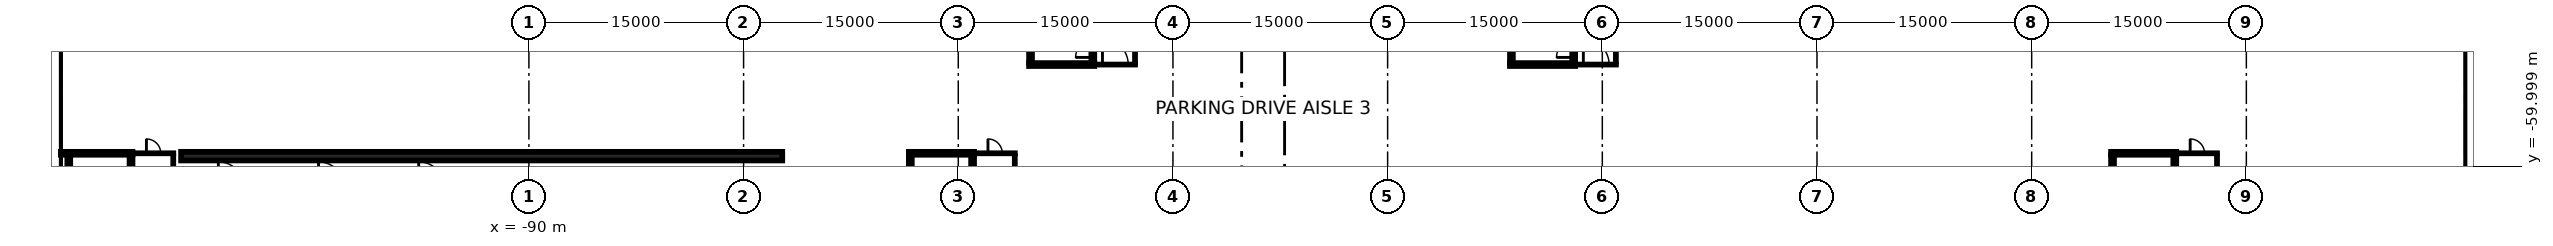
"""IFC4 building model, lengths in metres.
Left out: names, types, materials, properties, quantities, classifications, styles, units other than length and angle.
Written with IfcOpenShell. Run it as: python <this file> out.ifc"""

import sys

from ifc_helpers import new_model, si_unit, direction, frame, frame_2d, origin, place, context, subcontext, project, spatial, rectangle, extrude, element, fill, save


model = new_model("IFC4")
c1 = context("Model", 3, precision=1e-05, world=origin(), true_north=direction((0.0, 1.0)))
c2 = subcontext(c1, "Body", "Model", "MODEL_VIEW")
j1 = project(units=[si_unit("LENGTHUNIT", "METRE"), si_unit("PLANEANGLEUNIT", "RADIAN")], contexts=[c1])
p1 = place(None, origin())
s1 = spatial("IfcSite", under=j1, at=p1, CompositionType="ELEMENT")
p2 = place(p1, origin())
s2 = spatial("IfcBuilding", under=s1, at=p2, CompositionType="ELEMENT")
p3 = place(p2, frame((0.0, 0.0, -12.0)))
s3 = spatial("IfcBuildingStorey", under=s2, at=p3, CompositionType="ELEMENT", Elevation=-12.0)
for number, where, z_axis, x_axis in (
    (1, (-123.15, -80.0, 0.0), (0.0, 0.0, 1.0), (0.0, 1.0, 0.0)),
    (2, (45.75, -80.0, 0.0), (0.0, 0.0, 1.0), (0.0, 1.0, 0.0)),
):
    element("IfcWall", number, at=place(p3, frame(where, z_axis=z_axis, x_axis=x_axis)), inside=s3, PredefinedType="USERDEFINED", context=c2, shape_type="SweptSolid", body=[
        extrude(rectangle(XDim=160.0, YDim=0.9, at=frame_2d((80.0, 0.0))), origin(), (0.0, 0.0, 1.0), 11.55),
    ])
p4 = place(p2, frame((0.0, 0.0, -7.2)))
s4 = spatial("IfcBuildingStorey", under=s2, at=p4, CompositionType="ELEMENT", Elevation=-7.2)
p5 = place(p4, frame((-58.9, -59.1, 0.0), z_axis=(0.0, 0.0, 1.0), x_axis=(1.0, 0.0, 0.0)))
e3 = element("IfcWall", 3, at=p5, inside=s4, PredefinedType="PARTITIONING", context=c2, shape_type="SweptSolid", body=[
    extrude(rectangle(XDim=2.95, YDim=0.2, at=frame_2d((1.475, 0.0))), origin(), (0.0, 0.0, 1.0), 3.2),
])
p6 = place(p5, frame((0.975, 0.0, 0.0)))
e4 = element("IfcOpeningElement", 4, at=p6, cuts=e3, PredefinedType="OPENING", context=c2, shape_type="SweptSolid", body=[
    extrude(rectangle(XDim=1.0, YDim=2.1, at=frame_2d((0.5, 1.05))), frame((0.0, 0.11, 0.0), z_axis=(0.0, -1.0, 0.0), x_axis=(1.0, 0.0, 0.0)), (0.0, 0.0, 1.0), 0.22),
])
p7 = place(p4, frame((-56.05, -64.8, 0.0), z_axis=(0.0, 0.0, 1.0), x_axis=(0.0, 1.0, 0.0)))
e5 = element("IfcWall", 5, at=p7, inside=s4, PredefinedType="PARTITIONING", context=c2, shape_type="SweptSolid", body=[
    extrude(rectangle(XDim=5.6, YDim=0.2, at=frame_2d((2.8, 0.0))), origin(), (0.0, 0.0, 1.0), 3.2),
])
p8 = place(p4, frame((-50.5, -52.9, 0.0), z_axis=(0.0, 0.0, 1.0), x_axis=(1.0, 0.0, 0.0)))
e6 = element("IfcWall", 6, at=p8, inside=s4, PredefinedType="PARTITIONING", context=c2, shape_type="SweptSolid", body=[
    extrude(rectangle(XDim=2.95, YDim=0.2, at=frame_2d((1.475, 0.0))), origin(), (0.0, 0.0, 1.0), 3.2),
])
p9 = place(p8, frame((0.575, 0.0, 0.0)))
e7 = element("IfcOpeningElement", 7, at=p9, cuts=e6, PredefinedType="OPENING", context=c2, shape_type="SweptSolid", body=[
    extrude(rectangle(XDim=1.8, YDim=2.1, at=frame_2d((0.9, 1.05))), frame((0.0, 0.11, 0.0), z_axis=(0.0, -1.0, 0.0), x_axis=(1.0, 0.0, 0.0)), (0.0, 0.0, 1.0), 0.22),
])
p10 = place(p4, frame((-47.65, -52.8, 0.0), z_axis=(0.0, 0.0, 1.0), x_axis=(0.0, 1.0, 0.0)))
e8 = element("IfcWall", 8, at=p10, inside=s4, PredefinedType="PARTITIONING", context=c2, shape_type="SweptSolid", body=[
    extrude(rectangle(XDim=3.6, YDim=0.2, at=frame_2d((1.8, 0.0))), origin(), (0.0, 0.0, 1.0), 3.2),
])
p11 = place(p4, frame((-16.9, -52.9, 0.0), z_axis=(0.0, 0.0, 1.0), x_axis=(1.0, 0.0, 0.0)))
e9 = element("IfcWall", 9, at=p11, inside=s4, PredefinedType="PARTITIONING", context=c2, shape_type="SweptSolid", body=[
    extrude(rectangle(XDim=2.95, YDim=0.2, at=frame_2d((1.475, 0.0))), origin(), (0.0, 0.0, 1.0), 3.2),
])
p12 = place(p11, frame((0.575, 0.0, 0.0)))
e10 = element("IfcOpeningElement", 10, at=p12, cuts=e9, PredefinedType="OPENING", context=c2, shape_type="SweptSolid", body=[
    extrude(rectangle(XDim=1.8, YDim=2.1, at=frame_2d((0.9, 1.05))), frame((0.0, 0.11, 0.0), z_axis=(0.0, -1.0, 0.0), x_axis=(1.0, 0.0, 0.0)), (0.0, 0.0, 1.0), 0.22),
])
p13 = place(p4, frame((-14.05, -52.8, 0.0), z_axis=(0.0, 0.0, 1.0), x_axis=(0.0, 1.0, 0.0)))
e11 = element("IfcWall", 11, at=p13, inside=s4, PredefinedType="PARTITIONING", context=c2, shape_type="SweptSolid", body=[
    extrude(rectangle(XDim=3.6, YDim=0.2, at=frame_2d((1.8, 0.0))), origin(), (0.0, 0.0, 1.0), 3.2),
])
p14 = place(p4, frame((25.1, -59.1, 0.0), z_axis=(0.0, 0.0, 1.0), x_axis=(1.0, 0.0, 0.0)))
e12 = element("IfcWall", 12, at=p14, inside=s4, PredefinedType="PARTITIONING", context=c2, shape_type="SweptSolid", body=[
    extrude(rectangle(XDim=2.95, YDim=0.2, at=frame_2d((1.475, 0.0))), origin(), (0.0, 0.0, 1.0), 3.2),
])
p15 = place(p14, frame((0.975, 0.0, 0.0)))
e13 = element("IfcOpeningElement", 13, at=p15, cuts=e12, PredefinedType="OPENING", context=c2, shape_type="SweptSolid", body=[
    extrude(rectangle(XDim=1.0, YDim=2.1, at=frame_2d((0.5, 1.05))), frame((0.0, 0.11, 0.0), z_axis=(0.0, -1.0, 0.0), x_axis=(1.0, 0.0, 0.0)), (0.0, 0.0, 1.0), 0.22),
])
p16 = place(p4, frame((27.95, -64.8, 0.0), z_axis=(0.0, 0.0, 1.0), x_axis=(0.0, 1.0, 0.0)))
e14 = element("IfcWall", 14, at=p16, inside=s4, PredefinedType="PARTITIONING", context=c2, shape_type="SweptSolid", body=[
    extrude(rectangle(XDim=5.6, YDim=0.2, at=frame_2d((2.8, 0.0))), origin(), (0.0, 0.0, 1.0), 3.2),
])
p17 = place(p4, frame((-117.7, -59.1, 0.0), z_axis=(0.0, 0.0, 1.0), x_axis=(1.0, 0.0, 0.0)))
e15 = element("IfcWall", 15, at=p17, inside=s4, PredefinedType="PARTITIONING", context=c2, shape_type="SweptSolid", body=[
    extrude(rectangle(XDim=2.95, YDim=0.2, at=frame_2d((1.475, 0.0))), origin(), (0.0, 0.0, 1.0), 3.2),
])
p18 = place(p17, frame((0.975, 0.0, 0.0)))
e16 = element("IfcOpeningElement", 16, at=p18, cuts=e15, PredefinedType="OPENING", context=c2, shape_type="SweptSolid", body=[
    extrude(rectangle(XDim=1.0, YDim=2.1, at=frame_2d((0.5, 1.05))), frame((0.0, 0.11, 0.0), z_axis=(0.0, -1.0, 0.0), x_axis=(1.0, 0.0, 0.0)), (0.0, 0.0, 1.0), 0.22),
])
p19 = place(p4, frame((-114.85, -64.8, 0.0), z_axis=(0.0, 0.0, 1.0), x_axis=(0.0, 1.0, 0.0)))
e17 = element("IfcWall", 17, at=p19, inside=s4, PredefinedType="PARTITIONING", context=c2, shape_type="SweptSolid", body=[
    extrude(rectangle(XDim=5.6, YDim=0.2, at=frame_2d((2.8, 0.0))), origin(), (0.0, 0.0, 1.0), 3.2),
])
p20 = place(p4, frame((-63.35, -68.8, 0.0), z_axis=(0.0, 0.0, 1.0), x_axis=(0.0, 1.0, 0.0)))
e18 = element("IfcWall", 18, at=p20, inside=s4, PredefinedType="SOLIDWALL", context=c2, shape_type="SweptSolid", body=[
    extrude(rectangle(XDim=9.6, YDim=0.2, at=frame_2d((4.8, 0.0))), origin(), (0.0, 0.0, 1.0), 3.2),
])
p21 = place(p4, frame((-59.0, -68.8, 0.0), z_axis=(0.0, 0.0, 1.0), x_axis=(0.0, 1.0, 0.0)))
e19 = element("IfcWall", 19, at=p21, inside=s4, PredefinedType="SOLIDWALL", context=c2, shape_type="SweptSolid", body=[
    extrude(rectangle(XDim=9.6, YDim=0.2, at=frame_2d((4.8, 0.0))), origin(), (0.0, 0.0, 1.0), 3.2),
])
p22 = place(p21, frame((0.4, 0.0, 0.0)))
e20 = element("IfcOpeningElement", 20, at=p22, cuts=e19, PredefinedType="OPENING", context=c2, shape_type="SweptSolid", body=[
    extrude(rectangle(XDim=1.2, YDim=2.1, at=frame_2d((0.6, 1.05))), frame((0.0, 0.11, 0.0), z_axis=(0.0, -1.0, 0.0), x_axis=(1.0, 0.0, 0.0)), (0.0, 0.0, 1.0), 0.22),
])
p23 = place(p4, frame((-63.45, -59.1, 0.0), z_axis=(0.0, 0.0, 1.0), x_axis=(1.0, 0.0, 0.0)))
e21 = element("IfcWall", 21, at=p23, inside=s4, PredefinedType="SOLIDWALL", context=c2, shape_type="SweptSolid", body=[
    extrude(rectangle(XDim=4.55, YDim=0.2, at=frame_2d((2.275, 0.0))), origin(), (0.0, 0.0, 1.0), 3.2),
])
p24 = place(p4, frame((-54.95, -52.8, 0.0), z_axis=(0.0, 0.0, 1.0), x_axis=(0.0, 1.0, 0.0)))
e22 = element("IfcWall", 22, at=p24, inside=s4, PredefinedType="SOLIDWALL", context=c2, shape_type="SweptSolid", body=[
    extrude(rectangle(XDim=9.6, YDim=0.2, at=frame_2d((4.8, 0.0))), origin(), (0.0, 0.0, 1.0), 3.2),
])
p25 = place(p4, frame((-50.6, -52.8, 0.0), z_axis=(0.0, 0.0, 1.0), x_axis=(0.0, 1.0, 0.0)))
e23 = element("IfcWall", 23, at=p25, inside=s4, PredefinedType="SOLIDWALL", context=c2, shape_type="SweptSolid", body=[
    extrude(rectangle(XDim=9.6, YDim=0.2, at=frame_2d((4.8, 0.0))), origin(), (0.0, 0.0, 1.0), 3.2),
])
p26 = place(p25, frame((0.4, 0.0, 0.0)))
e24 = element("IfcOpeningElement", 24, at=p26, cuts=e23, PredefinedType="OPENING", context=c2, shape_type="SweptSolid", body=[
    extrude(rectangle(XDim=1.2, YDim=2.1, at=frame_2d((0.6, 1.05))), frame((0.0, 0.11, 0.0), z_axis=(0.0, -1.0, 0.0), x_axis=(1.0, 0.0, 0.0)), (0.0, 0.0, 1.0), 0.22),
])
p27 = place(p4, frame((-50.5, -52.9, 0.0), z_axis=(0.0, 0.0, 1.0), x_axis=(-1.0, 0.0, 0.0)))
e25 = element("IfcWall", 25, at=p27, inside=s4, PredefinedType="SOLIDWALL", context=c2, shape_type="SweptSolid", body=[
    extrude(rectangle(XDim=4.55, YDim=0.2, at=frame_2d((2.275, 0.0))), origin(), (0.0, 0.0, 1.0), 3.2),
])
p28 = place(p4, frame((-21.35, -52.8, 0.0), z_axis=(0.0, 0.0, 1.0), x_axis=(0.0, 1.0, 0.0)))
e26 = element("IfcWall", 26, at=p28, inside=s4, PredefinedType="SOLIDWALL", context=c2, shape_type="SweptSolid", body=[
    extrude(rectangle(XDim=9.6, YDim=0.2, at=frame_2d((4.8, 0.0))), origin(), (0.0, 0.0, 1.0), 3.2),
])
p29 = place(p4, frame((-17.0, -52.8, 0.0), z_axis=(0.0, 0.0, 1.0), x_axis=(0.0, 1.0, 0.0)))
e27 = element("IfcWall", 27, at=p29, inside=s4, PredefinedType="SOLIDWALL", context=c2, shape_type="SweptSolid", body=[
    extrude(rectangle(XDim=9.6, YDim=0.2, at=frame_2d((4.8, 0.0))), origin(), (0.0, 0.0, 1.0), 3.2),
])
p30 = place(p29, frame((0.4, 0.0, 0.0)))
e28 = element("IfcOpeningElement", 28, at=p30, cuts=e27, PredefinedType="OPENING", context=c2, shape_type="SweptSolid", body=[
    extrude(rectangle(XDim=1.2, YDim=2.1, at=frame_2d((0.6, 1.05))), frame((0.0, 0.11, 0.0), z_axis=(0.0, -1.0, 0.0), x_axis=(1.0, 0.0, 0.0)), (0.0, 0.0, 1.0), 0.22),
])
p31 = place(p4, frame((-16.9, -52.9, 0.0), z_axis=(0.0, 0.0, 1.0), x_axis=(-1.0, 0.0, 0.0)))
e29 = element("IfcWall", 29, at=p31, inside=s4, PredefinedType="SOLIDWALL", context=c2, shape_type="SweptSolid", body=[
    extrude(rectangle(XDim=4.55, YDim=0.2, at=frame_2d((2.275, 0.0))), origin(), (0.0, 0.0, 1.0), 3.2),
])
p32 = place(p4, frame((20.65, -68.8, 0.0), z_axis=(0.0, 0.0, 1.0), x_axis=(0.0, 1.0, 0.0)))
e30 = element("IfcWall", 30, at=p32, inside=s4, PredefinedType="SOLIDWALL", context=c2, shape_type="SweptSolid", body=[
    extrude(rectangle(XDim=9.6, YDim=0.2, at=frame_2d((4.8, 0.0))), origin(), (0.0, 0.0, 1.0), 3.2),
])
p33 = place(p4, frame((25.0, -68.8, 0.0), z_axis=(0.0, 0.0, 1.0), x_axis=(0.0, 1.0, 0.0)))
e31 = element("IfcWall", 31, at=p33, inside=s4, PredefinedType="SOLIDWALL", context=c2, shape_type="SweptSolid", body=[
    extrude(rectangle(XDim=9.6, YDim=0.2, at=frame_2d((4.8, 0.0))), origin(), (0.0, 0.0, 1.0), 3.2),
])
p34 = place(p33, frame((0.4, 0.0, 0.0)))
e32 = element("IfcOpeningElement", 32, at=p34, cuts=e31, PredefinedType="OPENING", context=c2, shape_type="SweptSolid", body=[
    extrude(rectangle(XDim=1.2, YDim=2.1, at=frame_2d((0.6, 1.05))), frame((0.0, 0.11, 0.0), z_axis=(0.0, -1.0, 0.0), x_axis=(1.0, 0.0, 0.0)), (0.0, 0.0, 1.0), 0.22),
])
p35 = place(p4, frame((20.55, -59.1, 0.0), z_axis=(0.0, 0.0, 1.0), x_axis=(1.0, 0.0, 0.0)))
e33 = element("IfcWall", 33, at=p35, inside=s4, PredefinedType="SOLIDWALL", context=c2, shape_type="SweptSolid", body=[
    extrude(rectangle(XDim=4.55, YDim=0.2, at=frame_2d((2.275, 0.0))), origin(), (0.0, 0.0, 1.0), 3.2),
])
p36 = place(p4, frame((-122.15, -68.8, 0.0), z_axis=(0.0, 0.0, 1.0), x_axis=(0.0, 1.0, 0.0)))
e34 = element("IfcWall", 34, at=p36, inside=s4, PredefinedType="SOLIDWALL", context=c2, shape_type="SweptSolid", body=[
    extrude(rectangle(XDim=9.6, YDim=0.2, at=frame_2d((4.8, 0.0))), origin(), (0.0, 0.0, 1.0), 3.2),
])
p37 = place(p4, frame((-117.8, -68.8, 0.0), z_axis=(0.0, 0.0, 1.0), x_axis=(0.0, 1.0, 0.0)))
e35 = element("IfcWall", 35, at=p37, inside=s4, PredefinedType="SOLIDWALL", context=c2, shape_type="SweptSolid", body=[
    extrude(rectangle(XDim=9.6, YDim=0.2, at=frame_2d((4.8, 0.0))), origin(), (0.0, 0.0, 1.0), 3.2),
])
p38 = place(p37, frame((0.4, 0.0, 0.0)))
e36 = element("IfcOpeningElement", 36, at=p38, cuts=e35, PredefinedType="OPENING", context=c2, shape_type="SweptSolid", body=[
    extrude(rectangle(XDim=1.2, YDim=2.1, at=frame_2d((0.6, 1.05))), frame((0.0, 0.11, 0.0), z_axis=(0.0, -1.0, 0.0), x_axis=(1.0, 0.0, 0.0)), (0.0, 0.0, 1.0), 0.22),
])
p39 = place(p4, frame((-122.7, -59.1, 0.0), z_axis=(0.0, 0.0, 1.0), x_axis=(1.0, 0.0, 0.0)))
e37 = element("IfcWall", 37, at=p39, inside=s4, PredefinedType="SOLIDWALL", context=c2, shape_type="SweptSolid", body=[
    extrude(rectangle(XDim=5.0, YDim=0.2, at=frame_2d((2.5, 0.0))), origin(), (0.0, 0.0, 1.0), 3.2),
])
p40 = place(p4, frame((-114.3, -59.3, 0.0), z_axis=(0.0, 0.0, 1.0), x_axis=(1.0, 0.0, 0.0)))
e38 = element("IfcWall", 38, at=p40, inside=s4, PredefinedType="SOLIDWALL", context=c2, shape_type="SweptSolid", body=[
    extrude(rectangle(XDim=42.0, YDim=0.6, at=frame_2d((21.0, 0.0))), origin(), (0.0, 0.0, 1.0), 3.2),
])
p41 = place(p6, origin())
e39 = element("IfcDoor", 39, at=p41, inside=s4, OperationType="SINGLE_SWING_LEFT", PredefinedType="DOOR", context=c2, shape_type="SweptSolid", body=[
    extrude(rectangle(XDim=1.0, YDim=2.1, at=frame_2d((0.5, 1.05))), frame((0.0, 0.025, 0.0), z_axis=(0.0, -1.0, 0.0), x_axis=(1.0, 0.0, 0.0)), (0.0, 0.0, 1.0), 0.05),
])
fill(e4, e39)
p42 = place(p9, origin())
e40 = element("IfcDoor", 40, at=p42, inside=s4, OperationType="DOUBLE_DOOR_SINGLE_SWING", PredefinedType="DOOR", context=c2, shape_type="SweptSolid", body=[
    extrude(rectangle(XDim=1.8, YDim=2.1, at=frame_2d((0.9, 1.05))), frame((0.0, 0.025, 0.0), z_axis=(0.0, -1.0, 0.0), x_axis=(1.0, 0.0, 0.0)), (0.0, 0.0, 1.0), 0.05),
])
fill(e7, e40)
p43 = place(p12, origin())
e41 = element("IfcDoor", 41, at=p43, inside=s4, OperationType="DOUBLE_DOOR_SINGLE_SWING", PredefinedType="DOOR", context=c2, shape_type="SweptSolid", body=[
    extrude(rectangle(XDim=1.8, YDim=2.1, at=frame_2d((0.9, 1.05))), frame((0.0, 0.025, 0.0), z_axis=(0.0, -1.0, 0.0), x_axis=(1.0, 0.0, 0.0)), (0.0, 0.0, 1.0), 0.05),
])
fill(e10, e41)
p44 = place(p15, origin())
e42 = element("IfcDoor", 42, at=p44, inside=s4, OperationType="SINGLE_SWING_LEFT", PredefinedType="DOOR", context=c2, shape_type="SweptSolid", body=[
    extrude(rectangle(XDim=1.0, YDim=2.1, at=frame_2d((0.5, 1.05))), frame((0.0, 0.025, 0.0), z_axis=(0.0, -1.0, 0.0), x_axis=(1.0, 0.0, 0.0)), (0.0, 0.0, 1.0), 0.05),
])
fill(e13, e42)
p45 = place(p18, origin())
e43 = element("IfcDoor", 43, at=p45, inside=s4, OperationType="SINGLE_SWING_LEFT", PredefinedType="DOOR", context=c2, shape_type="SweptSolid", body=[
    extrude(rectangle(XDim=1.0, YDim=2.1, at=frame_2d((0.5, 1.05))), frame((0.0, 0.025, 0.0), z_axis=(0.0, -1.0, 0.0), x_axis=(1.0, 0.0, 0.0)), (0.0, 0.0, 1.0), 0.05),
])
fill(e16, e43)
p46 = place(p26, origin())
e44 = element("IfcDoor", 44, at=p46, inside=s4, OperationType="SINGLE_SWING_LEFT", PredefinedType="DOOR", context=c2, shape_type="SweptSolid", body=[
    extrude(rectangle(XDim=1.2, YDim=2.1, at=frame_2d((0.6, 1.05))), frame((0.0, 0.025, 0.0), z_axis=(0.0, -1.0, 0.0), x_axis=(1.0, 0.0, 0.0)), (0.0, 0.0, 1.0), 0.05),
])
fill(e24, e44)
p47 = place(p30, origin())
e45 = element("IfcDoor", 45, at=p47, inside=s4, OperationType="SINGLE_SWING_LEFT", PredefinedType="DOOR", context=c2, shape_type="SweptSolid", body=[
    extrude(rectangle(XDim=1.2, YDim=2.1, at=frame_2d((0.6, 1.05))), frame((0.0, 0.025, 0.0), z_axis=(0.0, -1.0, 0.0), x_axis=(1.0, 0.0, 0.0)), (0.0, 0.0, 1.0), 0.05),
])
fill(e28, e45)
save(model, sys.argv[1])
